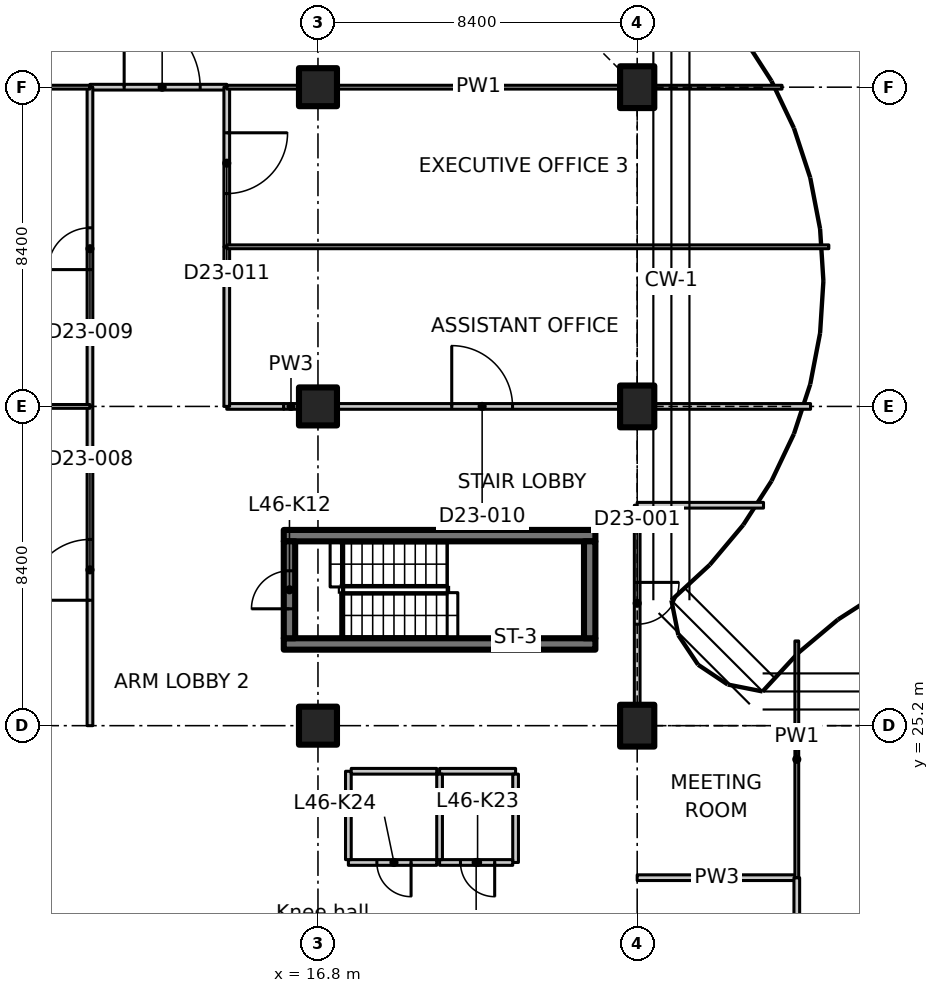
"""IFC4 building model, lengths in metres.
Left out: names, types, materials, properties, quantities, classifications, styles, units other than length and angle.
Written with IfcOpenShell. Run it as: python <this file> out.ifc"""

import sys

from ifc_helpers import new_model, si_unit, direction, frame, frame_2d, origin, origin_2d, place, context, subcontext, project, spatial, polyline, rectangle, outline, extrude, element, fill, save


model = new_model("IFC4")
c1 = context("Model", 3, precision=1e-05, world=origin(), true_north=direction((0.0, 1.0)))
c2 = subcontext(c1, "Body", "Model", "MODEL_VIEW")
j1 = project(units=[si_unit("LENGTHUNIT", "METRE"), si_unit("PLANEANGLEUNIT", "RADIAN")], contexts=[c1])
p1 = place(None, origin())
s1 = spatial("IfcSite", under=j1, at=p1, CompositionType="ELEMENT")
p2 = place(p1, origin())
s2 = spatial("IfcBuilding", under=s1, at=p2, CompositionType="ELEMENT")
p3 = place(p2, frame((0.0, 0.0, 184.8)))
s3 = spatial("IfcBuildingStorey", under=s2, at=p3, CompositionType="ELEMENT", Elevation=184.8)
for number, where, z_axis, x_axis in (
    (1, (16.8, 25.2, 0.0), (0.0, 0.0, 1.0), (1.0, 0.0, 0.0)),
    (2, (16.8, 33.6, 0.0), (0.0, 0.0, 1.0), (1.0, 0.0, 0.0)),
    (3, (16.8, 42.0, 0.0), (0.0, 0.0, 1.0), (1.0, 0.0, 0.0)),
):
    element("IfcColumn", number, at=place(p3, frame(where, z_axis=z_axis, x_axis=x_axis)), inside=s3, PredefinedType="COLUMN", context=c2, shape_type="SweptSolid", body=[
        extrude(rectangle(XDim=1.0, YDim=1.0, at=origin_2d()), origin(), (0.0, 0.0, 1.0), 3.35),
    ])
for number, where, z_axis, x_axis in (
    (4, (25.2, 25.2, 0.0), (0.0, 0.0, 1.0), (1.0, 0.0, 0.0)),
    (5, (25.2, 33.6, 0.0), (0.0, 0.0, 1.0), (1.0, 0.0, 0.0)),
    (6, (25.2, 42.0, 0.0), (0.0, 0.0, 1.0), (1.0, 0.0, 0.0)),
):
    element("IfcColumn", number, at=place(p3, frame(where, z_axis=z_axis, x_axis=x_axis)), inside=s3, PredefinedType="COLUMN", context=c2, shape_type="SweptSolid", body=[
        extrude(rectangle(XDim=0.9, YDim=1.1, at=origin_2d()), origin(), (0.0, 0.0, 1.0), 3.35),
    ])
for number, where, z_axis, x_axis in (
    (7, (15.9, 27.35, 0.0), (0.0, 0.0, 1.0), (1.0, 0.0, 0.0)),
    (8, (15.9, 30.2, 0.0), (0.0, 0.0, 1.0), (1.0, 0.0, 0.0)),
):
    element("IfcWall", number, at=place(p3, frame(where, z_axis=z_axis, x_axis=x_axis)), inside=s3, PredefinedType="SHEAR", context=c2, shape_type="SweptSolid", body=[
        extrude(rectangle(XDim=8.2, YDim=0.3, at=frame_2d((4.1, 0.0))), origin(), (0.0, 0.0, 1.0), 3.35),
    ])
p4 = place(p3, frame((16.05, 27.5, 0.0), z_axis=(0.0, 0.0, 1.0), x_axis=(0.0, 1.0, 0.0)))
e9 = element("IfcWall", 9, at=p4, inside=s3, PredefinedType="SHEAR", context=c2, shape_type="SweptSolid", body=[
    extrude(rectangle(XDim=2.55, YDim=0.3, at=frame_2d((1.275, 0.0))), origin(), (0.0, 0.0, 1.0), 3.35),
])
p5 = place(p4, frame((0.775, 0.0, 0.0)))
e10 = element("IfcOpeningElement", 10, at=p5, cuts=e9, PredefinedType="OPENING", context=c2, shape_type="SweptSolid", body=[
    extrude(rectangle(XDim=1.0, YDim=2.1, at=frame_2d((0.5, 1.05))), frame((0.0, 0.16, 0.0), z_axis=(0.0, -1.0, 0.0), x_axis=(1.0, 0.0, 0.0)), (0.0, 0.0, 1.0), 0.32),
])
p6 = place(p3, frame((23.95, 27.5, 0.0), z_axis=(0.0, 0.0, 1.0), x_axis=(0.0, 1.0, 0.0)))
e11 = element("IfcWall", 11, at=p6, inside=s3, PredefinedType="SHEAR", context=c2, shape_type="SweptSolid", body=[
    extrude(rectangle(XDim=2.55, YDim=0.3, at=frame_2d((1.275, 0.0))), origin(), (0.0, 0.0, 1.0), 3.35),
])
p7 = place(p3, frame((20.0, 24.0, 0.0), z_axis=(0.0, 0.0, 1.0), x_axis=(1.0, 0.0, 0.0)))
e12 = element("IfcWall", 12, at=p7, inside=s3, PredefinedType="PARTITIONING", context=c2, shape_type="SweptSolid", body=[
    extrude(rectangle(XDim=2.0, YDim=0.15, at=frame_2d((1.0, 0.0))), origin(), (0.0, 0.0, 1.0), 3.35),
])
p8 = place(p3, frame((22.0, 23.925, 0.0), z_axis=(0.0, 0.0, 1.0), x_axis=(0.0, -1.0, 0.0)))
e13 = element("IfcWall", 13, at=p8, inside=s3, PredefinedType="PARTITIONING", context=c2, shape_type="SweptSolid", body=[
    extrude(rectangle(XDim=2.325, YDim=0.15, at=frame_2d((1.163, 0.0))), origin(), (0.0, 0.0, 1.0), 3.35),
])
p9 = place(p3, frame((21.925, 21.6, 0.0), z_axis=(0.0, 0.0, 1.0), x_axis=(-1.0, 0.0, 0.0)))
e14 = element("IfcWall", 14, at=p9, inside=s3, PredefinedType="PARTITIONING", context=c2, shape_type="SweptSolid", body=[
    extrude(rectangle(XDim=1.925, YDim=0.15, at=frame_2d((0.962, 0.0))), origin(), (0.0, 0.0, 1.0), 3.35),
])
p10 = place(p9, frame((0.475, 0.0, 0.0)))
e15 = element("IfcOpeningElement", 15, at=p10, cuts=e14, PredefinedType="OPENING", context=c2, shape_type="SweptSolid", body=[
    extrude(rectangle(XDim=0.9, YDim=2.1, at=frame_2d((0.45, 1.05))), frame((0.0, 0.085, 0.0), z_axis=(0.0, -1.0, 0.0), x_axis=(1.0, 0.0, 0.0)), (0.0, 0.0, 1.0), 0.17),
])
p11 = place(p3, frame((20.0, 21.675, 0.0), z_axis=(0.0, 0.0, 1.0), x_axis=(0.0, 1.0, 0.0)))
e16 = element("IfcWall", 16, at=p11, inside=s3, PredefinedType="PARTITIONING", context=c2, shape_type="SweptSolid", body=[
    extrude(rectangle(XDim=2.25, YDim=0.15, at=frame_2d((1.125, 0.0))), origin(), (0.0, 0.0, 1.0), 3.35),
])
p12 = place(p3, frame((19.925, 21.6, 0.0), z_axis=(0.0, 0.0, 1.0), x_axis=(-1.0, 0.0, 0.0)))
e17 = element("IfcWall", 17, at=p12, inside=s3, PredefinedType="PARTITIONING", context=c2, shape_type="SweptSolid", body=[
    extrude(rectangle(XDim=2.325, YDim=0.15, at=frame_2d((1.163, 0.0))), origin(), (0.0, 0.0, 1.0), 3.35),
])
p13 = place(p12, frame((0.675, 0.0, 0.0)))
e18 = element("IfcOpeningElement", 18, at=p13, cuts=e17, PredefinedType="OPENING", context=c2, shape_type="SweptSolid", body=[
    extrude(rectangle(XDim=0.9, YDim=2.1, at=frame_2d((0.45, 1.05))), frame((0.0, 0.085, 0.0), z_axis=(0.0, -1.0, 0.0), x_axis=(1.0, 0.0, 0.0)), (0.0, 0.0, 1.0), 0.17),
])
p14 = place(p3, frame((17.6, 21.675, 0.0), z_axis=(0.0, 0.0, 1.0), x_axis=(0.0, 1.0, 0.0)))
e19 = element("IfcWall", 19, at=p14, inside=s3, PredefinedType="PARTITIONING", context=c2, shape_type="SweptSolid", body=[
    extrude(rectangle(XDim=2.325, YDim=0.15, at=frame_2d((1.163, 0.0))), origin(), (0.0, 0.0, 1.0), 3.35),
])
p15 = place(p3, frame((17.675, 24.0, 0.0), z_axis=(0.0, 0.0, 1.0), x_axis=(1.0, 0.0, 0.0)))
e20 = element("IfcWall", 20, at=p15, inside=s3, PredefinedType="PARTITIONING", context=c2, shape_type="SweptSolid", body=[
    extrude(rectangle(XDim=2.25, YDim=0.15, at=frame_2d((1.125, 0.0))), origin(), (0.0, 0.0, 1.0), 3.35),
])
p16 = place(p3, frame((25.2, 21.2, 0.0), z_axis=(0.0, 0.0, 1.0), x_axis=(1.0, 0.0, 0.0)))
e21 = element("IfcWall", 21, at=p16, inside=s3, PredefinedType="PARTITIONING", context=c2, shape_type="SweptSolid", body=[
    extrude(rectangle(XDim=4.2, YDim=0.15, at=frame_2d((2.1, 0.0))), origin(), (0.0, 0.0, 1.0), 3.33),
])
p17 = place(p3, frame((29.4, 21.2, 0.0), z_axis=(0.0, 0.0, 1.0), x_axis=(0.0, -1.0, 0.0)))
e22 = element("IfcWall", 22, at=p17, inside=s3, PredefinedType="PARTITIONING", context=c2, shape_type="SweptSolid", body=[
    extrude(rectangle(XDim=8.2, YDim=0.15, at=frame_2d((4.1, 0.0))), origin(), (0.0, 0.0, 1.0), 3.33),
])
p18 = place(p3, frame((29.4, 27.429, 0.0), z_axis=(0.0, 0.0, 1.0), x_axis=(0.0, -1.0, 0.0)))
e23 = element("IfcWall", 23, at=p18, inside=s3, PredefinedType="PARTITIONING", context=c2, shape_type="SweptSolid", body=[
    extrude(outline(polyline([(0.0, 0.0), (6.229, 0.0), (6.229, 3.33), (2.679, 3.33), (2.677, 2.98), (1.781, 2.98), (1.779, 3.33), (0.154, 3.33), (0.0, 3.33), (0.0, 0.0)])), frame((0.0, 0.05, 0.0), z_axis=(0.0, -1.0, 0.0), x_axis=(1.0, 0.0, 0.0)), (0.0, 0.0, 1.0), 0.1),
])
p19 = place(p3, frame((25.2, 31.0, 0.0), z_axis=(0.0, 0.0, 1.0), x_axis=(0.0, -1.0, 0.0)))
e24 = element("IfcWall", 24, at=p19, inside=s3, PredefinedType="PARTITIONING", context=c2, shape_type="SweptSolid", body=[
    extrude(outline(polyline([(0.0, 0.0), (5.23, 0.0), (5.23, 2.98), (0.0, 2.98), (0.0, 0.0)])), frame((0.0, 0.075, 0.0), z_axis=(0.0, -1.0, 0.0), x_axis=(1.0, 0.0, 0.0)), (0.0, 0.0, 1.0), 0.15),
])
p20 = place(p19, frame((2.03, 0.0, 0.0)))
e25 = element("IfcOpeningElement", 25, at=p20, cuts=e24, PredefinedType="OPENING", context=c2, shape_type="SweptSolid", body=[
    extrude(rectangle(XDim=1.1, YDim=2.1, at=frame_2d((0.55, 1.05))), frame((0.0, 0.085, 0.0), z_axis=(0.0, -1.0, 0.0), x_axis=(1.0, 0.0, 0.0)), (0.0, 0.0, 1.0), 0.17),
])
p21 = place(p3, frame((25.2, 31.0, 0.0), z_axis=(0.0, 0.0, 1.0), x_axis=(1.0, 0.0, 0.0)))
e26 = element("IfcWall", 26, at=p21, inside=s3, PredefinedType="PARTITIONING", context=c2, shape_type="SweptSolid", body=[
    extrude(rectangle(XDim=3.324, YDim=0.15, at=frame_2d((1.662, 0.0))), origin(), (0.0, 0.0, 1.0), 2.98),
])
p22 = place(p3, frame((10.8, 25.2, 0.0), z_axis=(0.0, 0.0, 1.0), x_axis=(0.0, 1.0, 0.0)))
e27 = element("IfcWall", 27, at=p22, inside=s3, PredefinedType="PARTITIONING", context=c2, shape_type="SweptSolid", body=[
    extrude(rectangle(XDim=8.4, YDim=0.15, at=frame_2d((4.2, 0.0))), origin(), (0.0, 0.0, 1.0), 3.33),
])
p23 = place(p22, frame((3.3, 0.0, 0.0)))
e28 = element("IfcOpeningElement", 28, at=p23, cuts=e27, PredefinedType="OPENING", context=c2, shape_type="SweptSolid", body=[
    extrude(rectangle(XDim=1.6, YDim=2.1, at=frame_2d((0.8, 1.05))), frame((0.0, 0.085, 0.0), z_axis=(0.0, -1.0, 0.0), x_axis=(1.0, 0.0, 0.0)), (0.0, 0.0, 1.0), 0.17),
])
p24 = place(p3, frame((14.4, 33.6, 0.0), z_axis=(0.0, 0.0, 1.0), x_axis=(1.0, 0.0, 0.0)))
e29 = element("IfcWall", 29, at=p24, inside=s3, PredefinedType="PARTITIONING", context=c2, shape_type="SweptSolid", body=[
    extrude(rectangle(XDim=1.5, YDim=0.15, at=frame_2d((0.75, 0.0))), origin(), (0.0, 0.0, 1.0), 3.33),
])
p25 = place(p3, frame((15.9, 33.6, 0.0), z_axis=(0.0, 0.0, 1.0), x_axis=(1.0, 0.0, 0.0)))
e30 = element("IfcWall", 30, at=p25, inside=s3, PredefinedType="PARTITIONING", context=c2, shape_type="SweptSolid", body=[
    extrude(rectangle(XDim=0.38, YDim=0.15, at=frame_2d((0.19, 0.0))), origin(), (0.0, 0.0, 1.0), 3.33),
])
p26 = place(p3, frame((17.32, 33.6, 0.0), z_axis=(0.0, 0.0, 1.0), x_axis=(1.0, 0.0, 0.0)))
e31 = element("IfcWall", 31, at=p26, inside=s3, PredefinedType="PARTITIONING", context=c2, shape_type="SweptSolid", body=[
    extrude(rectangle(XDim=7.41, YDim=0.15, at=frame_2d((3.705, 0.0))), origin(), (0.0, 0.0, 1.0), 3.33),
])
p27 = place(p26, frame((3.0, 0.0, 0.0)))
e32 = element("IfcOpeningElement", 32, at=p27, cuts=e31, PredefinedType="OPENING", context=c2, shape_type="SweptSolid", body=[
    extrude(rectangle(XDim=1.6, YDim=2.1, at=frame_2d((0.8, 1.05))), frame((0.0, 0.085, 0.0), z_axis=(0.0, -1.0, 0.0), x_axis=(1.0, 0.0, 0.0)), (0.0, 0.0, 1.0), 0.17),
])
p28 = place(p3, frame((25.67, 33.6, 0.0), z_axis=(0.0, 0.0, 1.0), x_axis=(1.0, 0.0, 0.0)))
e33 = element("IfcWall", 33, at=p28, inside=s3, PredefinedType="PARTITIONING", context=c2, shape_type="SweptSolid", body=[
    extrude(rectangle(XDim=4.092, YDim=0.15, at=frame_2d((2.046, 0.0))), origin(), (0.0, 0.0, 1.0), 2.98),
])
p29 = place(p3, frame((10.8, 42.0, 0.0), z_axis=(0.0, 0.0, 1.0), x_axis=(1.0, 0.0, 0.0)))
e34 = element("IfcWall", 34, at=p29, inside=s3, PredefinedType="PARTITIONING", context=c2, shape_type="SweptSolid", body=[
    extrude(rectangle(XDim=3.6, YDim=0.15, at=frame_2d((1.8, 0.0))), origin(), (0.0, 0.0, 1.0), 3.33),
])
p30 = place(p29, frame((0.9, 0.0, 0.0)))
e35 = element("IfcOpeningElement", 35, at=p30, cuts=e34, PredefinedType="OPENING", context=c2, shape_type="SweptSolid", body=[
    extrude(rectangle(XDim=2.0, YDim=2.4, at=frame_2d((1.0, 1.2))), frame((0.0, 0.085, 0.0), z_axis=(0.0, -1.0, 0.0), x_axis=(1.0, 0.0, 0.0)), (0.0, 0.0, 1.0), 0.17),
])
p31 = place(p3, frame((10.8, 33.6, 0.0), z_axis=(0.0, 0.0, 1.0), x_axis=(0.0, 1.0, 0.0)))
e36 = element("IfcWall", 36, at=p31, inside=s3, PredefinedType="PARTITIONING", context=c2, shape_type="SweptSolid", body=[
    extrude(rectangle(XDim=8.4, YDim=0.15, at=frame_2d((4.2, 0.0))), origin(), (0.0, 0.0, 1.0), 3.33),
])
p32 = place(p31, frame((3.6, 0.0, 0.0)))
e37 = element("IfcOpeningElement", 37, at=p32, cuts=e36, PredefinedType="OPENING", context=c2, shape_type="SweptSolid", body=[
    extrude(rectangle(XDim=1.1, YDim=2.1, at=frame_2d((0.55, 1.05))), frame((0.0, 0.085, 0.0), z_axis=(0.0, -1.0, 0.0), x_axis=(1.0, 0.0, 0.0)), (0.0, 0.0, 1.0), 0.17),
])
p33 = place(p3, frame((14.4, 37.8, 0.0), z_axis=(0.0, 0.0, 1.0), x_axis=(0.0, -1.0, 0.0)))
e38 = element("IfcWall", 38, at=p33, inside=s3, PredefinedType="PARTITIONING", context=c2, shape_type="SweptSolid", body=[
    extrude(rectangle(XDim=4.2, YDim=0.15, at=frame_2d((2.1, 0.0))), origin(), (0.0, 0.0, 1.0), 3.33),
])
p34 = place(p3, frame((14.4, 42.0, 0.0), z_axis=(0.0, 0.0, 1.0), x_axis=(0.0, -1.0, 0.0)))
e39 = element("IfcWall", 39, at=p34, inside=s3, PredefinedType="PARTITIONING", context=c2, shape_type="SweptSolid", body=[
    extrude(rectangle(XDim=4.2, YDim=0.15, at=frame_2d((2.1, 0.0))), origin(), (0.0, 0.0, 1.0), 3.33),
])
p35 = place(p34, frame((1.2, 0.0, 0.0)))
e40 = element("IfcOpeningElement", 40, at=p35, cuts=e39, PredefinedType="OPENING", context=c2, shape_type="SweptSolid", body=[
    extrude(rectangle(XDim=1.6, YDim=2.1, at=frame_2d((0.8, 1.05))), frame((0.0, 0.085, 0.0), z_axis=(0.0, -1.0, 0.0), x_axis=(1.0, 0.0, 0.0)), (0.0, 0.0, 1.0), 0.17),
])
p36 = place(p3, frame((10.8, 42.0, 0.0), z_axis=(0.0, 0.0, 1.0), x_axis=(-1.0, 0.0, 0.0)))
e41 = element("IfcWall", 41, at=p36, inside=s3, PredefinedType="PARTITIONING", context=c2, shape_type="SweptSolid", body=[
    extrude(rectangle(XDim=1.88, YDim=0.1, at=frame_2d((0.94, 0.0))), origin(), (0.0, 0.0, 1.0), 3.33),
])
p37 = place(p3, frame((29.011, 42.0, 0.0), z_axis=(0.0, 0.0, 1.0), x_axis=(-1.0, 0.0, 0.0)))
e42 = element("IfcWall", 42, at=p37, inside=s3, PredefinedType="PARTITIONING", context=c2, shape_type="SweptSolid", body=[
    extrude(rectangle(XDim=3.342, YDim=0.1, at=frame_2d((1.671, 0.0))), origin(), (0.0, 0.0, 1.0), 2.98),
])
p38 = place(p3, frame((24.73, 42.0, 0.0), z_axis=(0.0, 0.0, 1.0), x_axis=(-1.0, 0.0, 0.0)))
e43 = element("IfcWall", 43, at=p38, inside=s3, PredefinedType="PARTITIONING", context=c2, shape_type="SweptSolid", body=[
    extrude(outline(polyline([(0.0, 0.0), (7.41, 0.0), (7.41, 3.33), (0.196, 3.33), (0.194, 2.98), (0.0, 2.98), (0.0, 0.0)])), frame((0.0, 0.05, 0.0), z_axis=(0.0, -1.0, 0.0), x_axis=(1.0, 0.0, 0.0)), (0.0, 0.0, 1.0), 0.1),
])
for number, where, z_axis, x_axis in (
    (44, (16.28, 42.0, 0.0), (0.0, 0.0, 1.0), (-1.0, 0.0, 0.0)),
    (45, (8.92, 33.6, 0.0), (0.0, 0.0, 1.0), (1.0, 0.0, 0.0)),
):
    element("IfcWall", number, at=place(p3, frame(where, z_axis=z_axis, x_axis=x_axis)), inside=s3, PredefinedType="PARTITIONING", context=c2, shape_type="SweptSolid", body=[
        extrude(rectangle(XDim=1.88, YDim=0.1, at=frame_2d((0.94, 0.0))), origin(), (0.0, 0.0, 1.0), 3.33),
    ])
p39 = place(p3, frame((14.4, 37.8, 0.0), z_axis=(0.0, 0.0, 1.0), x_axis=(1.0, 0.0, 0.0)))
e46 = element("IfcWall", 46, at=p39, inside=s3, PredefinedType="PARTITIONING", context=c2, shape_type="SweptSolid", body=[
    extrude(outline(polyline([(0.0, 0.0), (15.843, 0.0), (15.843, 3.33), (11.25, 3.33), (11.248, 2.98), (10.352, 2.98), (10.35, 3.33), (0.0, 3.33), (0.0, 0.0)])), frame((0.0, 0.05, 0.0), z_axis=(0.0, -1.0, 0.0), x_axis=(1.0, 0.0, 0.0)), (0.0, 0.0, 1.0), 0.1),
])
p40 = place(p5, origin())
e47 = element("IfcDoor", 47, at=p40, inside=s3, OperationType="SINGLE_SWING_LEFT", PredefinedType="DOOR", context=c2, shape_type="SweptSolid", body=[
    extrude(rectangle(XDim=1.0, YDim=2.1, at=frame_2d((0.5, 1.05))), frame((0.0, 0.025, 0.0), z_axis=(0.0, -1.0, 0.0), x_axis=(1.0, 0.0, 0.0)), (0.0, 0.0, 1.0), 0.05),
])
fill(e10, e47)
p41 = place(p10, origin())
e48 = element("IfcDoor", 48, at=p41, inside=s3, OperationType="SINGLE_SWING_RIGHT", PredefinedType="DOOR", context=c2, shape_type="SweptSolid", body=[
    extrude(rectangle(XDim=0.9, YDim=2.1, at=frame_2d((0.45, 1.05))), frame((0.0, 0.025, 0.0), z_axis=(0.0, -1.0, 0.0), x_axis=(1.0, 0.0, 0.0)), (0.0, 0.0, 1.0), 0.05),
])
fill(e15, e48)
p42 = place(p13, origin())
e49 = element("IfcDoor", 49, at=p42, inside=s3, OperationType="SINGLE_SWING_LEFT", PredefinedType="DOOR", context=c2, shape_type="SweptSolid", body=[
    extrude(rectangle(XDim=0.9, YDim=2.1, at=frame_2d((0.45, 1.05))), frame((0.0, 0.025, 0.0), z_axis=(0.0, -1.0, 0.0), x_axis=(1.0, 0.0, 0.0)), (0.0, 0.0, 1.0), 0.05),
])
fill(e18, e49)
p43 = place(p20, origin())
e50 = element("IfcDoor", 50, at=p43, inside=s3, OperationType="SINGLE_SWING_RIGHT", PredefinedType="DOOR", context=c2, shape_type="SweptSolid", body=[
    extrude(rectangle(XDim=1.1, YDim=2.1, at=frame_2d((0.55, 1.05))), frame((0.0, 0.025, 0.0), z_axis=(0.0, -1.0, 0.0), x_axis=(1.0, 0.0, 0.0)), (0.0, 0.0, 1.0), 0.05),
])
fill(e25, e50)
p44 = place(p30, origin())
e51 = element("IfcDoor", 51, at=p44, inside=s3, OperationType="DOUBLE_DOOR_SINGLE_SWING", PredefinedType="DOOR", context=c2, shape_type="SweptSolid", body=[
    extrude(rectangle(XDim=2.0, YDim=2.4, at=frame_2d((1.0, 1.2))), frame((0.0, 0.025, 0.0), z_axis=(0.0, -1.0, 0.0), x_axis=(1.0, 0.0, 0.0)), (0.0, 0.0, 1.0), 0.05),
])
fill(e35, e51)
p45 = place(p23, origin())
e52 = element("IfcDoor", 52, at=p45, inside=s3, OperationType="DOUBLE_DOOR_SINGLE_SWING", PredefinedType="DOOR", context=c2, shape_type="SweptSolid", body=[
    extrude(rectangle(XDim=1.6, YDim=2.1, at=frame_2d((0.8, 1.05))), frame((0.0, 0.025, 0.0), z_axis=(0.0, -1.0, 0.0), x_axis=(1.0, 0.0, 0.0)), (0.0, 0.0, 1.0), 0.05),
])
fill(e28, e52)
p46 = place(p32, origin())
e53 = element("IfcDoor", 53, at=p46, inside=s3, OperationType="SINGLE_SWING_LEFT", PredefinedType="DOOR", context=c2, shape_type="SweptSolid", body=[
    extrude(rectangle(XDim=1.1, YDim=2.1, at=frame_2d((0.55, 1.05))), frame((0.0, 0.025, 0.0), z_axis=(0.0, -1.0, 0.0), x_axis=(1.0, 0.0, 0.0)), (0.0, 0.0, 1.0), 0.05),
])
fill(e37, e53)
p47 = place(p27, origin())
e54 = element("IfcDoor", 54, at=p47, inside=s3, OperationType="DOUBLE_DOOR_SINGLE_SWING", PredefinedType="DOOR", context=c2, shape_type="SweptSolid", body=[
    extrude(rectangle(XDim=1.6, YDim=2.1, at=frame_2d((0.8, 1.05))), frame((0.0, 0.025, 0.0), z_axis=(0.0, -1.0, 0.0), x_axis=(1.0, 0.0, 0.0)), (0.0, 0.0, 1.0), 0.05),
])
fill(e32, e54)
p48 = place(p35, origin())
e55 = element("IfcDoor", 55, at=p48, inside=s3, OperationType="DOUBLE_DOOR_SINGLE_SWING", PredefinedType="DOOR", context=c2, shape_type="SweptSolid", body=[
    extrude(rectangle(XDim=1.6, YDim=2.1, at=frame_2d((0.8, 1.05))), frame((0.0, 0.025, 0.0), z_axis=(0.0, -1.0, 0.0), x_axis=(1.0, 0.0, 0.0)), (0.0, 0.0, 1.0), 0.05),
])
fill(e40, e55)
save(model, sys.argv[1])
